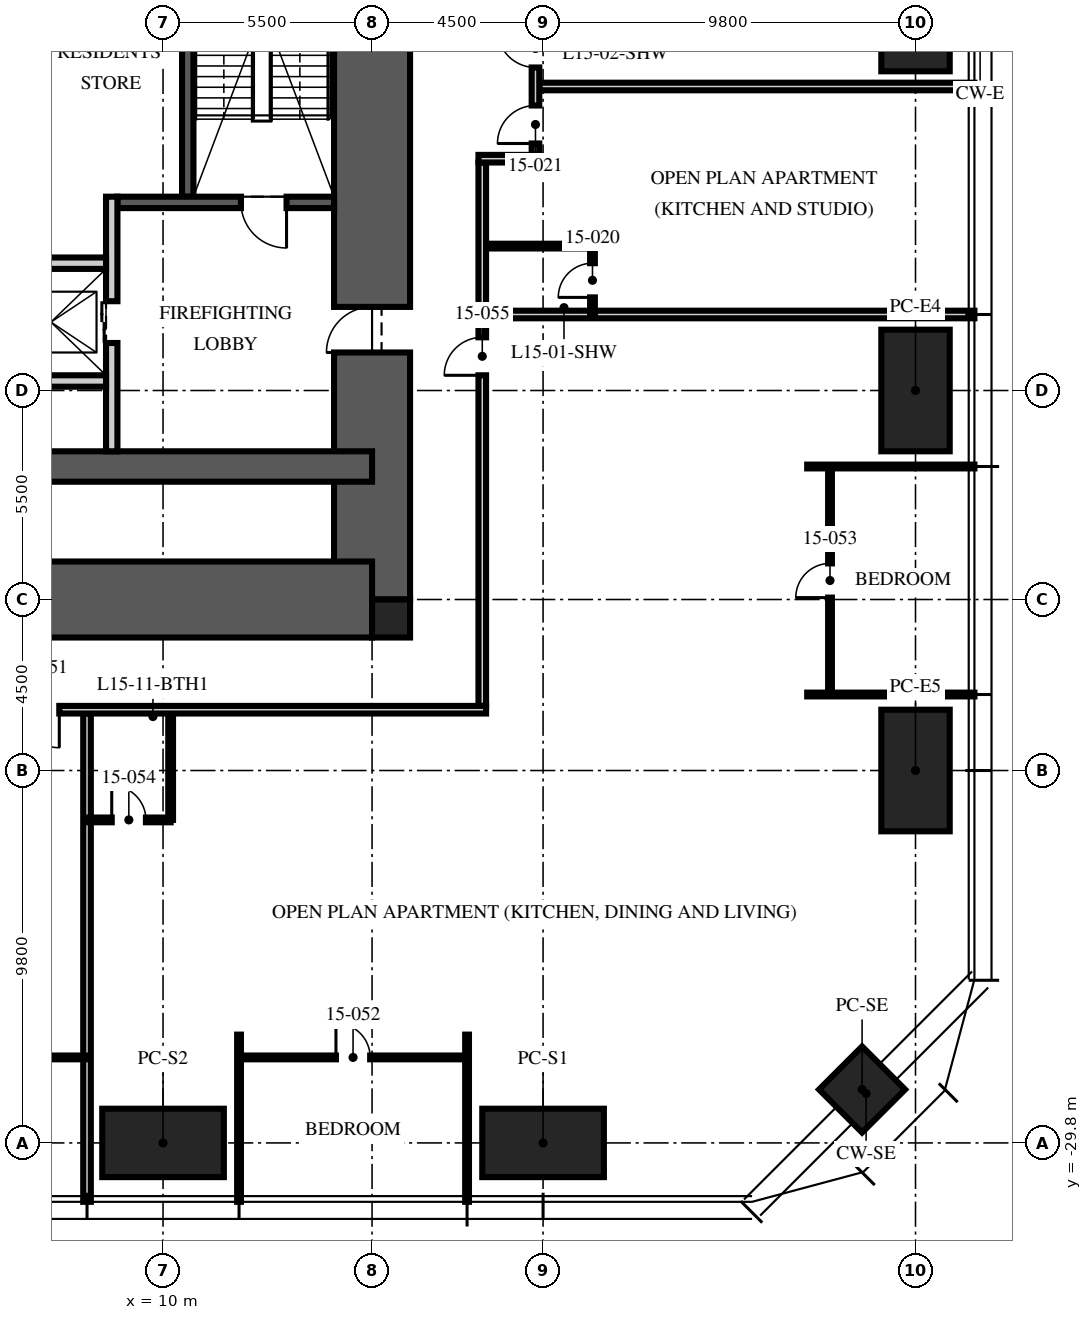
"""IFC4 building model, lengths in metres.
Left out: names, types, materials, properties, quantities, classifications, styles, units other than length and angle.
Written with IfcOpenShell. Run it as: python <this file> out.ifc"""

import sys

from ifc_helpers import new_model, si_unit, direction, frame, frame_2d, origin, origin_2d, place, context, subcontext, project, spatial, rectangle, hollow_rectangle, extrude, element, fill, save


model = new_model("IFC4")
c1 = context("Model", 3, precision=1e-05, world=origin(), true_north=direction((0.0, 1.0)))
c2 = subcontext(c1, "Body", "Model", "MODEL_VIEW")
j1 = project(units=[si_unit("LENGTHUNIT", "METRE"), si_unit("PLANEANGLEUNIT", "RADIAN")], contexts=[c1])
p1 = place(None, origin())
s1 = spatial("IfcSite", under=j1, at=p1, CompositionType="ELEMENT")
p2 = place(p1, origin())
s2 = spatial("IfcBuilding", under=s1, at=p2, CompositionType="ELEMENT")
p3 = place(p2, frame((0.0, 0.0, 62.25)))
s3 = spatial("IfcBuildingStorey", under=s2, at=p3, CompositionType="ELEMENT", Elevation=62.25)
p4 = place(p3, frame((15.5, -15.5, -0.25), z_axis=(0.0, 0.0, 1.0), x_axis=(0.0, 1.0, 0.0)))
e1 = element("IfcWall", 1, at=p4, inside=s3, PredefinedType="SHEAR", context=c2, shape_type="SweptSolid", body=[
    extrude(rectangle(XDim=31.0, YDim=2.0, at=frame_2d((15.5, 0.0))), origin(), (0.0, 0.0, 1.0), 3.75),
])
p5 = place(p4, frame((6.5, 0.0, 0.25)))
e2 = element("IfcOpeningElement", 2, at=p5, cuts=e1, PredefinedType="OPENING", context=c2, shape_type="SweptSolid", body=[
    extrude(rectangle(XDim=1.2, YDim=2.1, at=frame_2d((0.6, 1.05))), frame((0.0, 1.01, 0.0), z_axis=(0.0, -1.0, 0.0), x_axis=(1.0, 0.0, 0.0)), (0.0, 0.0, 1.0), 2.02),
])
p6 = place(p4, frame((23.0, 0.0, 0.25)))
e3 = element("IfcOpeningElement", 3, at=p6, cuts=e1, PredefinedType="OPENING", context=c2, shape_type="SweptSolid", body=[
    extrude(rectangle(XDim=1.8, YDim=2.1, at=frame_2d((0.9, 1.05))), frame((0.0, 1.01, 0.0), z_axis=(0.0, -1.0, 0.0), x_axis=(1.0, 0.0, 0.0)), (0.0, 0.0, 1.0), 2.02),
])
p7 = place(p3, frame((-15.5, -15.5, -0.25), z_axis=(0.0, 0.0, 1.0), x_axis=(1.0, 0.0, 0.0)))
e4 = element("IfcWall", 4, at=p7, inside=s3, PredefinedType="SHEAR", context=c2, shape_type="SweptSolid", body=[
    extrude(rectangle(XDim=31.0, YDim=2.0, at=frame_2d((15.5, 0.0))), origin(), (0.0, 0.0, 1.0), 3.75),
])
p8 = place(p3, frame((-15.5, -12.0, -0.25), z_axis=(0.0, 0.0, 1.0), x_axis=(1.0, 0.0, 0.0)))
e5 = element("IfcWall", 5, at=p8, inside=s3, PredefinedType="SHEAR", context=c2, shape_type="SweptSolid", body=[
    extrude(rectangle(XDim=31.0, YDim=0.8, at=frame_2d((15.5, 0.0))), origin(), (0.0, 0.0, 1.0), 3.75),
])
p9 = place(p3, frame((16.0, -16.0, -0.25), z_axis=(0.0, 0.0, 1.0), x_axis=(1.0, 0.0, 0.0)))
e6 = element("IfcColumn", 6, at=p9, inside=s3, PredefinedType="COLUMN", context=c2, shape_type="SweptSolid", body=[
    extrude(rectangle(XDim=1.0, YDim=1.0, at=origin_2d()), origin(), (0.0, 0.0, 1.0), 3.75),
])
for number, where, z_axis, x_axis in (
    (7, (29.8, 0.0, 0.0), (0.0, 0.0, 1.0), (0.0, 1.0, 0.0)),
    (8, (29.8, -10.0, 0.0), (0.0, 0.0, 1.0), (0.0, 1.0, 0.0)),
    (9, (29.8, -20.0, 0.0), (0.0, 0.0, 1.0), (0.0, 1.0, 0.0)),
    (10, (20.0, -29.8, 0.0), (0.0, 0.0, 1.0), (1.0, 0.0, 0.0)),
    (11, (10.0, -29.8, 0.0), (0.0, 0.0, 1.0), (1.0, 0.0, 0.0)),
):
    element("IfcColumn", number, at=place(p3, frame(where, z_axis=z_axis, x_axis=x_axis)), inside=s3, PredefinedType="COLUMN", context=c2, shape_type="SweptSolid", body=[
        extrude(hollow_rectangle(XDim=3.2, YDim=1.8, WallThickness=0.2, at=origin_2d()), origin(), (0.0, 0.0, 1.0), 3.75),
    ])
p10 = place(p3, frame((28.394, -28.394, 0.0), z_axis=(0.0, 0.0, 1.0), x_axis=(0.707106781187, 0.707106781187, 0.0)))
e12 = element("IfcColumn", 12, at=p10, inside=s3, PredefinedType="COLUMN", context=c2, shape_type="SweptSolid", body=[
    extrude(hollow_rectangle(XDim=1.6, YDim=1.6, WallThickness=0.1, at=origin_2d()), origin(), (0.0, 0.0, 1.0), 3.75),
])
p11 = place(p3, frame((10.65, -4.9, 0.0), z_axis=(0.0, 0.0, 1.0), x_axis=(0.0, 1.0, 0.0)))
e13 = element("IfcWall", 13, at=p11, inside=s3, PredefinedType="SOLIDWALL", context=c2, shape_type="SweptSolid", body=[
    extrude(rectangle(XDim=10.1, YDim=0.3, at=frame_2d((5.05, 0.0))), origin(), (0.0, 0.0, 1.0), 3.5),
])
p12 = place(p3, frame((14.5, -5.05, 0.0), z_axis=(0.0, 0.0, 1.0), x_axis=(-1.0, 0.0, 0.0)))
e14 = element("IfcWall", 14, at=p12, inside=s3, PredefinedType="SOLIDWALL", context=c2, shape_type="SweptSolid", body=[
    extrude(rectangle(XDim=5.7, YDim=0.3, at=frame_2d((2.85, 0.0))), origin(), (0.0, 0.0, 1.0), 3.5),
])
p13 = place(p12, frame((1.25, 0.0, 0.0)))
e15 = element("IfcOpeningElement", 15, at=p13, cuts=e14, PredefinedType="OPENING", context=c2, shape_type="SweptSolid", body=[
    extrude(rectangle(XDim=1.2, YDim=2.1, at=frame_2d((0.6, 1.05))), frame((0.0, 0.16, 0.0), z_axis=(0.0, -1.0, 0.0), x_axis=(1.0, 0.0, 0.0)), (0.0, 0.0, 1.0), 0.32),
])
p14 = place(p3, frame((8.65, -11.6, 0.0), z_axis=(0.0, 0.0, 1.0), x_axis=(0.0, 1.0, 0.0)))
e16 = element("IfcWall", 16, at=p14, inside=s3, PredefinedType="PARTITIONING", context=c2, shape_type="SweptSolid", body=[
    extrude(rectangle(XDim=6.7, YDim=0.3, at=frame_2d((3.35, 0.0))), origin(), (0.0, 0.0, 1.0), 3.5),
])
p15 = place(p14, frame((2.85, 0.0, 0.0)))
e17 = element("IfcOpeningElement", 17, at=p15, cuts=e16, PredefinedType="OPENING", context=c2, shape_type="SweptSolid", body=[
    extrude(rectangle(XDim=1.1, YDim=2.1, at=frame_2d((0.55, 1.05))), frame((0.0, 0.16, 0.0), z_axis=(0.0, -1.0, 0.0), x_axis=(1.0, 0.0, 0.0)), (0.0, 0.0, 1.0), 0.32),
])
p16 = place(p3, frame((-8.5, -6.65, 0.0), z_axis=(0.0, 0.0, 1.0), x_axis=(1.0, 0.0, 0.0)))
e18 = element("IfcWall", 18, at=p16, inside=s3, PredefinedType="PARTITIONING", context=c2, shape_type="SweptSolid", body=[
    extrude(rectangle(XDim=17.0, YDim=0.3, at=frame_2d((8.5, 0.0))), origin(), (0.0, 0.0, 1.0), 3.5),
])
p17 = place(p16, frame((7.8, 0.0, 0.0)))
e19 = element("IfcOpeningElement", 19, at=p17, cuts=e18, PredefinedType="OPENING", context=c2, shape_type="SweptSolid", body=[
    extrude(rectangle(XDim=1.3, YDim=2.4, at=frame_2d((0.65, 1.2))), frame((0.0, 0.16, 0.0), z_axis=(0.0, -1.0, 0.0), x_axis=(1.0, 0.0, 0.0)), (0.0, 0.0, 1.0), 0.32),
])
p18 = place(p16, frame((5.65, 0.0, 0.0)))
e20 = element("IfcOpeningElement", 20, at=p18, cuts=e18, PredefinedType="OPENING", context=c2, shape_type="SweptSolid", body=[
    extrude(rectangle(XDim=0.9, YDim=2.1, at=frame_2d((0.45, 1.05))), frame((0.0, 0.16, 0.0), z_axis=(0.0, -1.0, 0.0), x_axis=(1.0, 0.0, 0.0)), (0.0, 0.0, 1.0), 0.32),
])
p19 = place(p16, frame((10.4, 0.0, 0.0)))
e21 = element("IfcOpeningElement", 21, at=p19, cuts=e18, PredefinedType="OPENING", context=c2, shape_type="SweptSolid", body=[
    extrude(rectangle(XDim=0.9, YDim=2.1, at=frame_2d((0.45, 1.05))), frame((0.0, 0.16, 0.0), z_axis=(0.0, -1.0, 0.0), x_axis=(1.0, 0.0, 0.0)), (0.0, 0.0, 1.0), 0.32),
])
p20 = place(p3, frame((5.6, -9.75, 0.0), z_axis=(0.0, 0.0, 1.0), x_axis=(1.0, 0.0, 0.0)))
e22 = element("IfcWall", 22, at=p20, inside=s3, PredefinedType="PARTITIONING", context=c2, shape_type="SweptSolid", body=[
    extrude(rectangle(XDim=2.9, YDim=0.3, at=frame_2d((1.45, 0.0))), origin(), (0.0, 0.0, 1.0), 3.5),
])
p21 = place(p3, frame((18.5, -8.0, 0.0), z_axis=(0.0, 0.0, 1.0), x_axis=(1.0, 0.0, 0.0)))
e23 = element("IfcWall", 23, at=p21, inside=s3, PredefinedType="PARTITIONING", context=c2, shape_type="SweptSolid", body=[
    extrude(rectangle(XDim=12.85, YDim=0.2, at=frame_2d((6.425, 0.0))), origin(), (0.0, 0.0, 1.0), 2.71),
])
p22 = place(p3, frame((19.9, -2.0, 0.0), z_axis=(0.0, 0.0, 1.0), x_axis=(1.0, 0.0, 0.0)))
e24 = element("IfcWall", 24, at=p22, inside=s3, PredefinedType="PARTITIONING", context=c2, shape_type="SweptSolid", body=[
    extrude(rectangle(XDim=11.45, YDim=0.2, at=frame_2d((5.725, 0.0))), origin(), (0.0, 0.0, 1.0), 2.71),
])
p23 = place(p3, frame((8.0, -18.5, 0.0), z_axis=(0.0, 0.0, 1.0), x_axis=(0.0, -1.0, 0.0)))
e25 = element("IfcWall", 25, at=p23, inside=s3, PredefinedType="PARTITIONING", context=c2, shape_type="SweptSolid", body=[
    extrude(rectangle(XDim=12.85, YDim=0.2, at=frame_2d((6.425, 0.0))), origin(), (0.0, 0.0, 1.0), 2.71),
])
for number, where, z_axis, x_axis in (
    (26, (12.0, -26.95, 0.0), (0.0, 0.0, 1.0), (0.0, -1.0, 0.0)),
    (27, (18.0, -26.95, 0.0), (0.0, 0.0, 1.0), (0.0, -1.0, 0.0)),
    (28, (26.95, -18.0, 0.0), (0.0, 0.0, 1.0), (1.0, 0.0, 0.0)),
    (29, (26.95, -12.0, 0.0), (0.0, 0.0, 1.0), (1.0, 0.0, 0.0)),
):
    element("IfcWall", number, at=place(p3, frame(where, z_axis=z_axis, x_axis=x_axis)), inside=s3, PredefinedType="PARTITIONING", context=c2, shape_type="SweptSolid", body=[
        extrude(rectangle(XDim=4.4, YDim=0.1, at=frame_2d((2.2, 0.0))), origin(), (0.0, 0.0, 1.0), 2.71),
    ])
p24 = place(p3, frame((21.3, -8.0, 0.0), z_axis=(0.0, 0.0, 1.0), x_axis=(0.0, 1.0, 0.0)))
e30 = element("IfcWall", 30, at=p24, inside=s3, PredefinedType="PARTITIONING", context=c2, shape_type="SweptSolid", body=[
    extrude(rectangle(XDim=1.8, YDim=0.125, at=frame_2d((0.9, 0.0))), origin(), (0.0, 0.0, 1.0), 3.5),
])
p25 = place(p24, frame((0.45, 0.0, 0.0)))
e31 = element("IfcOpeningElement", 31, at=p25, cuts=e30, PredefinedType="OPENING", context=c2, shape_type="SweptSolid", body=[
    extrude(rectangle(XDim=0.9, YDim=2.1, at=frame_2d((0.45, 1.05))), frame((0.0, 0.073, 0.0), z_axis=(0.0, -1.0, 0.0), x_axis=(1.0, 0.0, 0.0)), (0.0, 0.0, 1.0), 0.145),
])
p26 = place(p3, frame((18.5, -6.2, 0.0), z_axis=(0.0, 0.0, 1.0), x_axis=(1.0, 0.0, 0.0)))
e32 = element("IfcWall", 32, at=p26, inside=s3, PredefinedType="PARTITIONING", context=c2, shape_type="SweptSolid", body=[
    extrude(rectangle(XDim=2.8, YDim=0.125, at=frame_2d((1.4, 0.0))), origin(), (0.0, 0.0, 1.0), 3.5),
])
p27 = place(p3, frame((2.0, -27.55, 0.0), z_axis=(0.0, 0.0, 1.0), x_axis=(1.0, 0.0, 0.0)))
e33 = element("IfcWall", 33, at=p27, inside=s3, PredefinedType="PARTITIONING", context=c2, shape_type="SweptSolid", body=[
    extrude(rectangle(XDim=6.0, YDim=0.1, at=frame_2d((3.0, 0.0))), origin(), (0.0, 0.0, 1.0), 2.61),
])
p28 = place(p27, frame((2.55, 0.0, 0.0)))
e34 = element("IfcOpeningElement", 34, at=p28, cuts=e33, PredefinedType="OPENING", context=c2, shape_type="SweptSolid", body=[
    extrude(rectangle(XDim=0.9, YDim=2.1, at=frame_2d((0.45, 1.05))), frame((0.0, 0.06, 0.0), z_axis=(0.0, -1.0, 0.0), x_axis=(1.0, 0.0, 0.0)), (0.0, 0.0, 1.0), 0.12),
])
p29 = place(p3, frame((12.0, -27.55, 0.0), z_axis=(0.0, 0.0, 1.0), x_axis=(1.0, 0.0, 0.0)))
e35 = element("IfcWall", 35, at=p29, inside=s3, PredefinedType="PARTITIONING", context=c2, shape_type="SweptSolid", body=[
    extrude(rectangle(XDim=6.0, YDim=0.1, at=frame_2d((3.0, 0.0))), origin(), (0.0, 0.0, 1.0), 2.61),
])
p30 = place(p29, frame((2.55, 0.0, 0.0)))
e36 = element("IfcOpeningElement", 36, at=p30, cuts=e35, PredefinedType="OPENING", context=c2, shape_type="SweptSolid", body=[
    extrude(rectangle(XDim=0.9, YDim=2.1, at=frame_2d((0.45, 1.05))), frame((0.0, 0.06, 0.0), z_axis=(0.0, -1.0, 0.0), x_axis=(1.0, 0.0, 0.0)), (0.0, 0.0, 1.0), 0.12),
])
p31 = place(p3, frame((27.55, -18.0, 0.0), z_axis=(0.0, 0.0, 1.0), x_axis=(0.0, 1.0, 0.0)))
e37 = element("IfcWall", 37, at=p31, inside=s3, PredefinedType="PARTITIONING", context=c2, shape_type="SweptSolid", body=[
    extrude(rectangle(XDim=6.0, YDim=0.1, at=frame_2d((3.0, 0.0))), origin(), (0.0, 0.0, 1.0), 2.61),
])
p32 = place(p31, frame((2.55, 0.0, 0.0)))
e38 = element("IfcOpeningElement", 38, at=p32, cuts=e37, PredefinedType="OPENING", context=c2, shape_type="SweptSolid", body=[
    extrude(rectangle(XDim=0.9, YDim=2.1, at=frame_2d((0.45, 1.05))), frame((0.0, 0.06, 0.0), z_axis=(0.0, -1.0, 0.0), x_axis=(1.0, 0.0, 0.0)), (0.0, 0.0, 1.0), 0.12),
])
p33 = place(p3, frame((8.0, -21.3, 0.0), z_axis=(0.0, 0.0, 1.0), x_axis=(1.0, 0.0, 0.0)))
e39 = element("IfcWall", 39, at=p33, inside=s3, PredefinedType="PARTITIONING", context=c2, shape_type="SweptSolid", body=[
    extrude(rectangle(XDim=2.2, YDim=0.125, at=frame_2d((1.1, 0.0))), origin(), (0.0, 0.0, 1.0), 2.492),
])
p34 = place(p33, frame((0.65, 0.0, 0.0)))
e40 = element("IfcOpeningElement", 40, at=p34, cuts=e39, PredefinedType="OPENING", context=c2, shape_type="SweptSolid", body=[
    extrude(rectangle(XDim=0.9, YDim=2.1, at=frame_2d((0.45, 1.05))), frame((0.0, 0.073, 0.0), z_axis=(0.0, -1.0, 0.0), x_axis=(1.0, 0.0, 0.0)), (0.0, 0.0, 1.0), 0.145),
])
p35 = place(p3, frame((10.2, -18.5, 0.0), z_axis=(0.0, 0.0, 1.0), x_axis=(0.0, -1.0, 0.0)))
e41 = element("IfcWall", 41, at=p35, inside=s3, PredefinedType="PARTITIONING", context=c2, shape_type="SweptSolid", body=[
    extrude(rectangle(XDim=2.8, YDim=0.125, at=frame_2d((1.4, 0.0))), origin(), (0.0, 0.0, 1.0), 2.492),
])
p36 = place(p3, frame((18.4, -18.3, 0.0), z_axis=(0.0, 0.0, 1.0), x_axis=(0.0, 1.0, 0.0)))
e42 = element("IfcWall", 42, at=p36, inside=s3, PredefinedType="PARTITIONING", context=c2, shape_type="SweptSolid", body=[
    extrude(rectangle(XDim=14.3, YDim=0.2, at=frame_2d((7.15, 0.0))), origin(), (0.0, 0.0, 1.0), 2.3),
])
p37 = place(p36, frame((8.7, 0.0, 0.0)))
e43 = element("IfcOpeningElement", 43, at=p37, cuts=e42, PredefinedType="OPENING", context=c2, shape_type="SweptSolid", body=[
    extrude(rectangle(XDim=1.0, YDim=2.2, at=frame_2d((0.5, 1.1))), frame((0.0, 0.11, 0.0), z_axis=(0.0, -1.0, 0.0), x_axis=(1.0, 0.0, 0.0)), (0.0, 0.0, 1.0), 0.22),
])
p38 = place(p3, frame((18.3, -3.9, 0.0), z_axis=(0.0, 0.0, 1.0), x_axis=(1.0, 0.0, 0.0)))
e44 = element("IfcWall", 44, at=p38, inside=s3, PredefinedType="PARTITIONING", context=c2, shape_type="SweptSolid", body=[
    extrude(rectangle(XDim=1.6, YDim=0.2, at=frame_2d((0.8, 0.0))), origin(), (0.0, 0.0, 1.0), 3.5),
])
p39 = place(p3, frame((19.8, -3.8, 0.0), z_axis=(0.0, 0.0, 1.0), x_axis=(0.0, 1.0, 0.0)))
e45 = element("IfcWall", 45, at=p39, inside=s3, PredefinedType="PARTITIONING", context=c2, shape_type="SweptSolid", body=[
    extrude(rectangle(XDim=3.6, YDim=0.2, at=frame_2d((1.8, 0.0))), origin(), (0.0, 0.0, 1.0), 3.5),
])
p40 = place(p39, frame((0.3, 0.0, 0.0)))
e46 = element("IfcOpeningElement", 46, at=p40, cuts=e45, PredefinedType="OPENING", context=c2, shape_type="SweptSolid", body=[
    extrude(rectangle(XDim=1.0, YDim=2.2, at=frame_2d((0.5, 1.1))), frame((0.0, 0.11, 0.0), z_axis=(0.0, -1.0, 0.0), x_axis=(1.0, 0.0, 0.0)), (0.0, 0.0, 1.0), 0.22),
])
p41 = place(p39, frame((2.3, 0.0, 0.0)))
e47 = element("IfcOpeningElement", 47, at=p41, cuts=e45, PredefinedType="OPENING", context=c2, shape_type="SweptSolid", body=[
    extrude(rectangle(XDim=1.0, YDim=2.2, at=frame_2d((0.5, 1.1))), frame((0.0, 0.11, 0.0), z_axis=(0.0, -1.0, 0.0), x_axis=(1.0, 0.0, 0.0)), (0.0, 0.0, 1.0), 0.22),
])
p42 = place(p3, frame((18.5, -18.4, 0.0), z_axis=(0.0, 0.0, 1.0), x_axis=(-1.0, 0.0, 0.0)))
e48 = element("IfcWall", 48, at=p42, inside=s3, PredefinedType="PARTITIONING", context=c2, shape_type="SweptSolid", body=[
    extrude(rectangle(XDim=37.0, YDim=0.2, at=frame_2d((18.5, 0.0))), origin(), (0.0, 0.0, 1.0), 2.3),
])
p43 = place(p42, frame((27.23, 0.0, 0.0)))
e49 = element("IfcOpeningElement", 49, at=p43, cuts=e48, PredefinedType="OPENING", context=c2, shape_type="SweptSolid", body=[
    extrude(rectangle(XDim=1.0, YDim=2.2, at=frame_2d((0.5, 1.1))), frame((0.0, 0.11, 0.0), z_axis=(0.0, -1.0, 0.0), x_axis=(1.0, 0.0, 0.0)), (0.0, 0.0, 1.0), 0.22),
])
p44 = place(p42, frame((20.93, 0.0, 0.0)))
e50 = element("IfcOpeningElement", 50, at=p44, cuts=e48, PredefinedType="OPENING", context=c2, shape_type="SweptSolid", body=[
    extrude(rectangle(XDim=1.0, YDim=2.2, at=frame_2d((0.5, 1.1))), frame((0.0, 0.11, 0.0), z_axis=(0.0, -1.0, 0.0), x_axis=(1.0, 0.0, 0.0)), (0.0, 0.0, 1.0), 0.22),
])
p45 = place(p42, frame((11.23, 0.0, 0.0)))
e51 = element("IfcOpeningElement", 51, at=p45, cuts=e48, PredefinedType="OPENING", context=c2, shape_type="SweptSolid", body=[
    extrude(rectangle(XDim=1.0, YDim=2.2, at=frame_2d((0.5, 1.1))), frame((0.0, 0.11, 0.0), z_axis=(0.0, -1.0, 0.0), x_axis=(1.0, 0.0, 0.0)), (0.0, 0.0, 1.0), 0.22),
])
p46 = place(p13, origin())
e52 = element("IfcDoor", 52, at=p46, inside=s3, OperationType="SINGLE_SWING_LEFT", PredefinedType="DOOR", context=c2, shape_type="SweptSolid", body=[
    extrude(rectangle(XDim=1.2, YDim=2.1, at=frame_2d((0.6, 1.05))), frame((0.0, 0.025, 0.0), z_axis=(0.0, -1.0, 0.0), x_axis=(1.0, 0.0, 0.0)), (0.0, 0.0, 1.0), 0.05),
])
fill(e15, e52)
p47 = place(p5, origin())
e53 = element("IfcDoor", 53, at=p47, inside=s3, OperationType="SINGLE_SWING_LEFT", PredefinedType="DOOR", context=c2, shape_type="SweptSolid", body=[
    extrude(rectangle(XDim=1.2, YDim=2.1, at=frame_2d((0.6, 1.05))), frame((0.0, 0.025, 0.0), z_axis=(0.0, -1.0, 0.0), x_axis=(1.0, 0.0, 0.0)), (0.0, 0.0, 1.0), 0.05),
])
fill(e2, e53)
p48 = place(p15, origin())
e54 = element("IfcDoor", 54, at=p48, inside=s3, OperationType="DOUBLE_DOOR_SLIDING", PredefinedType="DOOR", context=c2, shape_type="SweptSolid", body=[
    extrude(rectangle(XDim=1.1, YDim=2.1, at=frame_2d((0.55, 1.05))), frame((0.0, 0.025, 0.0), z_axis=(0.0, -1.0, 0.0), x_axis=(1.0, 0.0, 0.0)), (0.0, 0.0, 1.0), 0.05),
])
fill(e17, e54)
p49 = place(p25, origin())
e55 = element("IfcDoor", 55, at=p49, inside=s3, OperationType="SINGLE_SWING_LEFT", PredefinedType="DOOR", context=c2, shape_type="SweptSolid", body=[
    extrude(rectangle(XDim=0.9, YDim=2.1, at=frame_2d((0.45, 1.05))), frame((0.0, 0.025, 0.0), z_axis=(0.0, -1.0, 0.0), x_axis=(1.0, 0.0, 0.0)), (0.0, 0.0, 1.0), 0.05),
])
fill(e31, e55)
p50 = place(p40, origin())
e56 = element("IfcDoor", 56, at=p50, inside=s3, OperationType="SINGLE_SWING_LEFT", PredefinedType="DOOR", context=c2, shape_type="SweptSolid", body=[
    extrude(rectangle(XDim=1.0, YDim=2.2, at=frame_2d((0.5, 1.1))), frame((0.0, 0.025, 0.0), z_axis=(0.0, -1.0, 0.0), x_axis=(1.0, 0.0, 0.0)), (0.0, 0.0, 1.0), 0.05),
])
fill(e46, e56)
p51 = place(p41, origin())
e57 = element("IfcDoor", 57, at=p51, inside=s3, OperationType="SINGLE_SWING_RIGHT", PredefinedType="DOOR", context=c2, shape_type="SweptSolid", body=[
    extrude(rectangle(XDim=1.0, YDim=2.2, at=frame_2d((0.5, 1.1))), frame((0.0, 0.025, 0.0), z_axis=(0.0, -1.0, 0.0), x_axis=(1.0, 0.0, 0.0)), (0.0, 0.0, 1.0), 0.05),
])
fill(e47, e57)
p52 = place(p45, origin())
e58 = element("IfcDoor", 58, at=p52, inside=s3, OperationType="SINGLE_SWING_LEFT", PredefinedType="DOOR", context=c2, shape_type="SweptSolid", body=[
    extrude(rectangle(XDim=1.0, YDim=2.2, at=frame_2d((0.5, 1.1))), frame((0.0, 0.025, 0.0), z_axis=(0.0, -1.0, 0.0), x_axis=(1.0, 0.0, 0.0)), (0.0, 0.0, 1.0), 0.05),
])
fill(e51, e58)
p53 = place(p30, origin())
e59 = element("IfcDoor", 59, at=p53, inside=s3, OperationType="SINGLE_SWING_LEFT", PredefinedType="DOOR", context=c2, shape_type="SweptSolid", body=[
    extrude(rectangle(XDim=0.9, YDim=2.1, at=frame_2d((0.45, 1.05))), frame((0.0, 0.025, 0.0), z_axis=(0.0, -1.0, 0.0), x_axis=(1.0, 0.0, 0.0)), (0.0, 0.0, 1.0), 0.05),
])
fill(e36, e59)
p54 = place(p32, origin())
e60 = element("IfcDoor", 60, at=p54, inside=s3, OperationType="SINGLE_SWING_LEFT", PredefinedType="DOOR", context=c2, shape_type="SweptSolid", body=[
    extrude(rectangle(XDim=0.9, YDim=2.1, at=frame_2d((0.45, 1.05))), frame((0.0, 0.025, 0.0), z_axis=(0.0, -1.0, 0.0), x_axis=(1.0, 0.0, 0.0)), (0.0, 0.0, 1.0), 0.05),
])
fill(e38, e60)
p55 = place(p34, origin())
e61 = element("IfcDoor", 61, at=p55, inside=s3, OperationType="SINGLE_SWING_LEFT", PredefinedType="DOOR", context=c2, shape_type="SweptSolid", body=[
    extrude(rectangle(XDim=0.9, YDim=2.1, at=frame_2d((0.45, 1.05))), frame((0.0, 0.025, 0.0), z_axis=(0.0, -1.0, 0.0), x_axis=(1.0, 0.0, 0.0)), (0.0, 0.0, 1.0), 0.05),
])
fill(e40, e61)
p56 = place(p37, origin())
e62 = element("IfcDoor", 62, at=p56, inside=s3, OperationType="SINGLE_SWING_LEFT", PredefinedType="DOOR", context=c2, shape_type="SweptSolid", body=[
    extrude(rectangle(XDim=1.0, YDim=2.2, at=frame_2d((0.5, 1.1))), frame((0.0, 0.025, 0.0), z_axis=(0.0, -1.0, 0.0), x_axis=(1.0, 0.0, 0.0)), (0.0, 0.0, 1.0), 0.05),
])
fill(e43, e62)
save(model, sys.argv[1])
